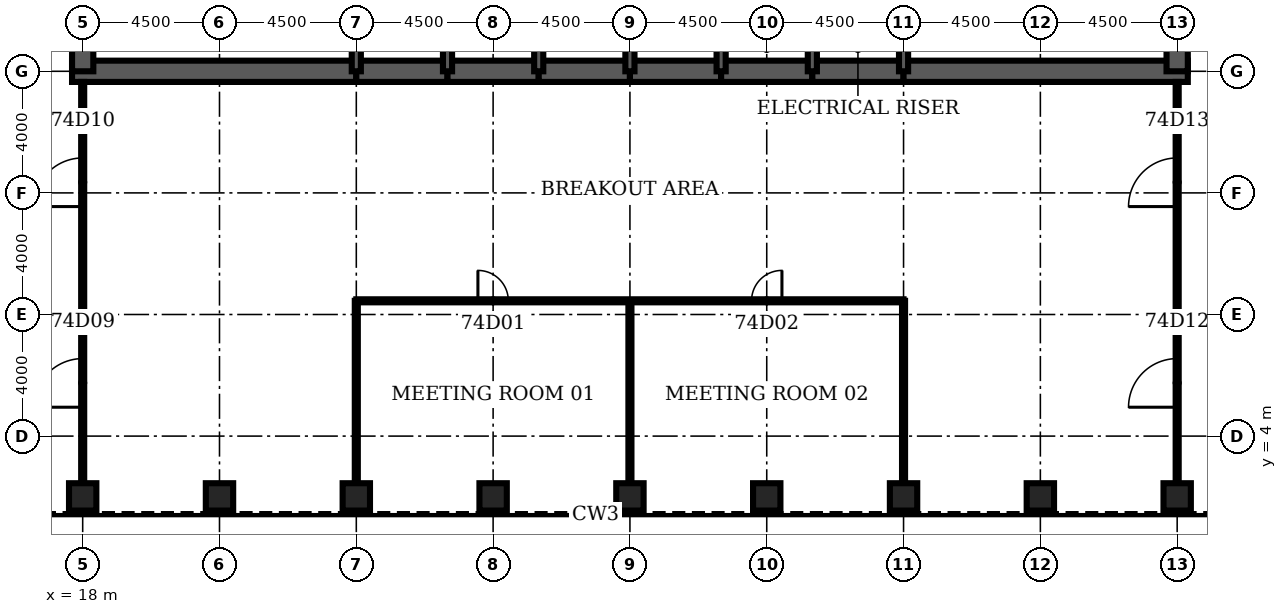
"""IFC4 building model, lengths in metres.
Left out: names, types, materials, properties, quantities, classifications, styles, units other than length and angle.
Written with IfcOpenShell. Run it as: python <this file> out.ifc"""

import sys

from ifc_helpers import new_model, si_unit, direction, frame, frame_2d, origin, origin_2d, place, context, subcontext, project, spatial, rectangle, hollow_rectangle, extrude, element, fill, save


model = new_model("IFC4")
c1 = context("Model", 3, precision=1e-05, world=origin(), true_north=direction((0.0, 1.0)))
c2 = subcontext(c1, "Body", "Model", "MODEL_VIEW")
j1 = project(units=[si_unit("LENGTHUNIT", "METRE"), si_unit("PLANEANGLEUNIT", "RADIAN")], contexts=[c1])
p1 = place(None, origin())
s1 = spatial("IfcSite", under=j1, at=p1, CompositionType="ELEMENT")
p2 = place(p1, origin())
s2 = spatial("IfcBuilding", under=s1, at=p2, CompositionType="ELEMENT")
p3 = place(p2, frame((0.0, 0.0, 325.7)))
s3 = spatial("IfcBuildingStorey", under=s2, at=p3, CompositionType="ELEMENT", Elevation=325.7)
for number, where, z_axis, x_axis in (
    (1, (18.0, 2.0, 0.0), (0.0, 0.0, 1.0), (0.0, 1.0, 0.0)),
    (2, (22.5, 2.0, 0.0), (0.0, 0.0, 1.0), (0.0, 1.0, 0.0)),
    (3, (27.0, 2.0, 0.0), (0.0, 0.0, 1.0), (0.0, 1.0, 0.0)),
    (4, (31.5, 2.0, 0.0), (0.0, 0.0, 1.0), (0.0, 1.0, 0.0)),
    (5, (36.0, 2.0, 0.0), (0.0, 0.0, 1.0), (0.0, 1.0, 0.0)),
    (6, (40.5, 2.0, 0.0), (0.0, 0.0, 1.0), (0.0, 1.0, 0.0)),
    (7, (45.0, 2.0, 0.0), (0.0, 0.0, 1.0), (0.0, 1.0, 0.0)),
    (8, (49.5, 2.0, 0.0), (0.0, 0.0, 1.0), (0.0, 1.0, 0.0)),
    (9, (54.0, 2.0, 0.0), (0.0, 0.0, 1.0), (0.0, 1.0, 0.0)),
):
    element("IfcColumn", number, at=place(p3, frame(where, z_axis=z_axis, x_axis=x_axis)), inside=s3, PredefinedType="COLUMN", context=c2, shape_type="SweptSolid", body=[
        extrude(hollow_rectangle(XDim=0.9, YDim=0.9, WallThickness=0.05, at=origin_2d()), origin(), (0.0, 0.0, 1.0), 4.2),
    ])
p4 = place(p3, frame((17.65, 16.0, 0.0), z_axis=(0.0, 0.0, 1.0), x_axis=(1.0, 0.0, 0.0)))
e10 = element("IfcWall", 10, at=p4, inside=s3, PredefinedType="SHEAR", context=c2, shape_type="SweptSolid", body=[
    extrude(rectangle(XDim=9.35, YDim=0.7, at=frame_2d((4.675, 0.0))), origin(), (0.0, 0.0, 1.0), 4.2),
])
for number, where, z_axis, x_axis in (
    (11, (27.0, 16.0, 0.0), (0.0, 0.0, 1.0), (1.0, 0.0, 0.0)),
    (12, (30.0, 16.0, 0.0), (0.0, 0.0, 1.0), (1.0, 0.0, 0.0)),
    (13, (33.0, 16.0, 0.0), (0.0, 0.0, 1.0), (1.0, 0.0, 0.0)),
    (14, (36.0, 16.0, 0.0), (0.0, 0.0, 1.0), (1.0, 0.0, 0.0)),
    (15, (39.0, 16.0, 0.0), (0.0, 0.0, 1.0), (1.0, 0.0, 0.0)),
    (16, (42.0, 16.0, 0.0), (0.0, 0.0, 1.0), (1.0, 0.0, 0.0)),
):
    element("IfcWall", number, at=place(p3, frame(where, z_axis=z_axis, x_axis=x_axis)), inside=s3, PredefinedType="SHEAR", context=c2, shape_type="SweptSolid", body=[
        extrude(rectangle(XDim=3.0, YDim=0.7, at=frame_2d((1.5, 0.0))), origin(), (0.0, 0.0, 1.0), 4.2),
    ])
p5 = place(p3, frame((45.0, 16.0, 0.0), z_axis=(0.0, 0.0, 1.0), x_axis=(1.0, 0.0, 0.0)))
e17 = element("IfcWall", 17, at=p5, inside=s3, PredefinedType="SHEAR", context=c2, shape_type="SweptSolid", body=[
    extrude(rectangle(XDim=9.35, YDim=0.7, at=frame_2d((4.675, 0.0))), origin(), (0.0, 0.0, 1.0), 4.2),
])
for number, where, z_axis, x_axis in (
    (18, (18.0, 19.2, 0.0), (0.0, 0.0, 1.0), (0.0, -1.0, 0.0)),
    (19, (54.0, 16.0, 0.0), (0.0, 0.0, 1.0), (0.0, 1.0, 0.0)),
):
    element("IfcWall", number, at=place(p3, frame(where, z_axis=z_axis, x_axis=x_axis)), inside=s3, PredefinedType="SHEAR", context=c2, shape_type="SweptSolid", body=[
        extrude(rectangle(XDim=3.2, YDim=0.7, at=frame_2d((1.6, 0.0))), origin(), (0.0, 0.0, 1.0), 4.2),
    ])
for number, where, z_axis, x_axis in (
    (20, (27.0, 16.0, 0.0), (0.0, 0.0, 1.0), (0.0, 1.0, 0.0)),
    (21, (30.0, 16.0, 0.0), (0.0, 0.0, 1.0), (0.0, 1.0, 0.0)),
    (22, (33.0, 16.0, 0.0), (0.0, 0.0, 1.0), (0.0, 1.0, 0.0)),
    (23, (36.0, 16.0, 0.0), (0.0, 0.0, 1.0), (0.0, 1.0, 0.0)),
    (24, (39.0, 16.0, 0.0), (0.0, 0.0, 1.0), (0.0, 1.0, 0.0)),
    (25, (42.0, 16.0, 0.0), (0.0, 0.0, 1.0), (0.0, 1.0, 0.0)),
    (26, (45.0, 16.0, 0.0), (0.0, 0.0, 1.0), (0.0, 1.0, 0.0)),
):
    element("IfcWall", number, at=place(p3, frame(where, z_axis=z_axis, x_axis=x_axis)), inside=s3, PredefinedType="SOLIDWALL", context=c2, shape_type="SweptSolid", body=[
        extrude(rectangle(XDim=3.2, YDim=0.3, at=frame_2d((1.6, 0.0))), origin(), (0.0, 0.0, 1.0), 4.2),
    ])
p6 = place(p3, frame((27.0, 8.45, 0.0), z_axis=(0.0, 0.0, 1.0), x_axis=(1.0, 0.0, 0.0)))
e27 = element("IfcWall", 27, at=p6, inside=s3, PredefinedType="PARTITIONING", context=c2, shape_type="SweptSolid", body=[
    extrude(rectangle(XDim=18.0, YDim=0.1, at=frame_2d((9.0, 0.0))), origin(), (0.0, 0.0, 1.0), 3.0),
])
p7 = place(p6, frame((4.0, 0.0, 0.0)))
e28 = element("IfcOpeningElement", 28, at=p7, cuts=e27, PredefinedType="OPENING", context=c2, shape_type="SweptSolid", body=[
    extrude(rectangle(XDim=1.0, YDim=2.1, at=frame_2d((0.5, 1.05))), frame((0.0, 0.06, 0.0), z_axis=(0.0, -1.0, 0.0), x_axis=(1.0, 0.0, 0.0)), (0.0, 0.0, 1.0), 0.12),
])
p8 = place(p6, frame((13.0, 0.0, 0.0)))
e29 = element("IfcOpeningElement", 29, at=p8, cuts=e27, PredefinedType="OPENING", context=c2, shape_type="SweptSolid", body=[
    extrude(rectangle(XDim=1.0, YDim=2.1, at=frame_2d((0.5, 1.05))), frame((0.0, 0.06, 0.0), z_axis=(0.0, -1.0, 0.0), x_axis=(1.0, 0.0, 0.0)), (0.0, 0.0, 1.0), 0.12),
])
p9 = place(p3, frame((18.0, 2.45, 0.0), z_axis=(0.0, 0.0, 1.0), x_axis=(0.0, 1.0, 0.0)))
e30 = element("IfcWall", 30, at=p9, inside=s3, PredefinedType="PARTITIONING", context=c2, shape_type="SweptSolid", body=[
    extrude(rectangle(XDim=13.2, YDim=0.1, at=frame_2d((6.6, 0.0))), origin(), (0.0, 0.0, 1.0), 3.0),
])
p10 = place(p9, frame((2.5, 0.0, 0.0)))
e31 = element("IfcOpeningElement", 31, at=p10, cuts=e30, PredefinedType="OPENING", context=c2, shape_type="SweptSolid", body=[
    extrude(rectangle(XDim=1.6, YDim=2.1, at=frame_2d((0.8, 1.05))), frame((0.0, 0.06, 0.0), z_axis=(0.0, -1.0, 0.0), x_axis=(1.0, 0.0, 0.0)), (0.0, 0.0, 1.0), 0.12),
])
p11 = place(p9, frame((9.1, 0.0, 0.0)))
e32 = element("IfcOpeningElement", 32, at=p11, cuts=e30, PredefinedType="OPENING", context=c2, shape_type="SweptSolid", body=[
    extrude(rectangle(XDim=1.6, YDim=2.1, at=frame_2d((0.8, 1.05))), frame((0.0, 0.06, 0.0), z_axis=(0.0, -1.0, 0.0), x_axis=(1.0, 0.0, 0.0)), (0.0, 0.0, 1.0), 0.12),
])
for number, where, z_axis, x_axis in (
    (33, (27.0, 2.45, 0.0), (0.0, 0.0, 1.0), (0.0, 1.0, 0.0)),
    (34, (36.0, 2.45, 0.0), (0.0, 0.0, 1.0), (0.0, 1.0, 0.0)),
    (35, (45.0, 2.45, 0.0), (0.0, 0.0, 1.0), (0.0, 1.0, 0.0)),
):
    element("IfcWall", number, at=place(p3, frame(where, z_axis=z_axis, x_axis=x_axis)), inside=s3, PredefinedType="PARTITIONING", context=c2, shape_type="SweptSolid", body=[
        extrude(rectangle(XDim=6.0, YDim=0.1, at=frame_2d((3.0, 0.0))), origin(), (0.0, 0.0, 1.0), 3.0),
    ])
p12 = place(p3, frame((54.0, 2.45, 0.0), z_axis=(0.0, 0.0, 1.0), x_axis=(0.0, 1.0, 0.0)))
e36 = element("IfcWall", 36, at=p12, inside=s3, PredefinedType="PARTITIONING", context=c2, shape_type="SweptSolid", body=[
    extrude(rectangle(XDim=13.2, YDim=0.1, at=frame_2d((6.6, 0.0))), origin(), (0.0, 0.0, 1.0), 3.0),
])
p13 = place(p12, frame((2.5, 0.0, 0.0)))
e37 = element("IfcOpeningElement", 37, at=p13, cuts=e36, PredefinedType="OPENING", context=c2, shape_type="SweptSolid", body=[
    extrude(rectangle(XDim=1.6, YDim=2.1, at=frame_2d((0.8, 1.05))), frame((0.0, 0.06, 0.0), z_axis=(0.0, -1.0, 0.0), x_axis=(1.0, 0.0, 0.0)), (0.0, 0.0, 1.0), 0.12),
])
p14 = place(p12, frame((9.1, 0.0, 0.0)))
e38 = element("IfcOpeningElement", 38, at=p14, cuts=e36, PredefinedType="OPENING", context=c2, shape_type="SweptSolid", body=[
    extrude(rectangle(XDim=1.6, YDim=2.1, at=frame_2d((0.8, 1.05))), frame((0.0, 0.06, 0.0), z_axis=(0.0, -1.0, 0.0), x_axis=(1.0, 0.0, 0.0)), (0.0, 0.0, 1.0), 0.12),
])
p15 = place(p7, origin())
e39 = element("IfcDoor", 39, at=p15, inside=s3, OperationType="SINGLE_SWING_LEFT", PredefinedType="DOOR", context=c2, shape_type="SweptSolid", body=[
    extrude(rectangle(XDim=1.0, YDim=2.1, at=frame_2d((0.5, 1.05))), frame((0.0, 0.025, 0.0), z_axis=(0.0, -1.0, 0.0), x_axis=(1.0, 0.0, 0.0)), (0.0, 0.0, 1.0), 0.05),
])
fill(e28, e39)
p16 = place(p8, origin())
e40 = element("IfcDoor", 40, at=p16, inside=s3, OperationType="SINGLE_SWING_RIGHT", PredefinedType="DOOR", context=c2, shape_type="SweptSolid", body=[
    extrude(rectangle(XDim=1.0, YDim=2.1, at=frame_2d((0.5, 1.05))), frame((0.0, 0.025, 0.0), z_axis=(0.0, -1.0, 0.0), x_axis=(1.0, 0.0, 0.0)), (0.0, 0.0, 1.0), 0.05),
])
fill(e29, e40)
p17 = place(p10, origin())
e41 = element("IfcDoor", 41, at=p17, inside=s3, OperationType="SINGLE_SWING_LEFT", PredefinedType="DOOR", context=c2, shape_type="SweptSolid", body=[
    extrude(rectangle(XDim=1.6, YDim=2.1, at=frame_2d((0.8, 1.05))), frame((0.0, 0.025, 0.0), z_axis=(0.0, -1.0, 0.0), x_axis=(1.0, 0.0, 0.0)), (0.0, 0.0, 1.0), 0.05),
])
fill(e31, e41)
p18 = place(p11, origin())
e42 = element("IfcDoor", 42, at=p18, inside=s3, OperationType="SINGLE_SWING_LEFT", PredefinedType="DOOR", context=c2, shape_type="SweptSolid", body=[
    extrude(rectangle(XDim=1.6, YDim=2.1, at=frame_2d((0.8, 1.05))), frame((0.0, 0.025, 0.0), z_axis=(0.0, -1.0, 0.0), x_axis=(1.0, 0.0, 0.0)), (0.0, 0.0, 1.0), 0.05),
])
fill(e32, e42)
p19 = place(p13, origin())
e43 = element("IfcDoor", 43, at=p19, inside=s3, OperationType="SINGLE_SWING_LEFT", PredefinedType="DOOR", context=c2, shape_type="SweptSolid", body=[
    extrude(rectangle(XDim=1.6, YDim=2.1, at=frame_2d((0.8, 1.05))), frame((0.0, 0.025, 0.0), z_axis=(0.0, -1.0, 0.0), x_axis=(1.0, 0.0, 0.0)), (0.0, 0.0, 1.0), 0.05),
])
fill(e37, e43)
p20 = place(p14, origin())
e44 = element("IfcDoor", 44, at=p20, inside=s3, OperationType="SINGLE_SWING_LEFT", PredefinedType="DOOR", context=c2, shape_type="SweptSolid", body=[
    extrude(rectangle(XDim=1.6, YDim=2.1, at=frame_2d((0.8, 1.05))), frame((0.0, 0.025, 0.0), z_axis=(0.0, -1.0, 0.0), x_axis=(1.0, 0.0, 0.0)), (0.0, 0.0, 1.0), 0.05),
])
fill(e38, e44)
save(model, sys.argv[1])
